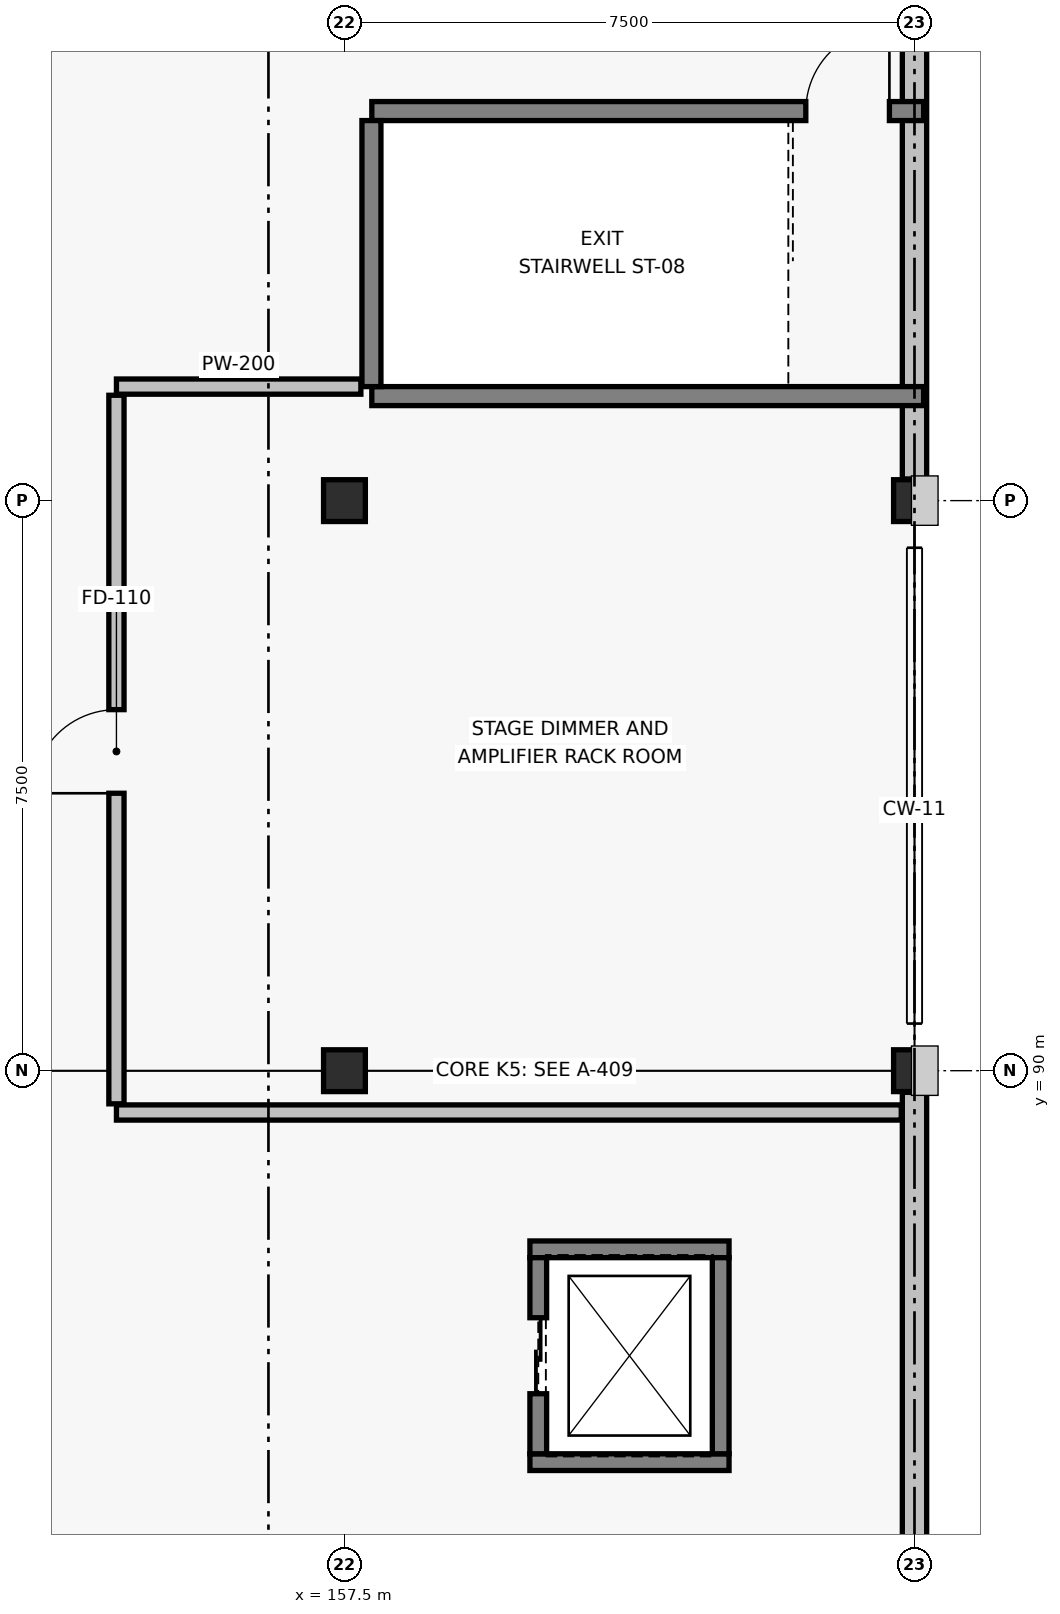
"""IFC4 building model, lengths in metres.
Left out: names, types, materials, properties, quantities, classifications, styles, units other than length and angle.
Written with IfcOpenShell. Run it as: python <this file> out.ifc"""

import sys

from ifc_helpers import new_model, si_unit, direction, frame, frame_2d, origin, origin_2d, place, context, subcontext, project, spatial, rectangle, extrude, element, fill, save


model = new_model("IFC4")
c1 = context("Model", 3, precision=1e-05, world=origin(), true_north=direction((0.0, 1.0)))
c2 = subcontext(c1, "Body", "Model", "MODEL_VIEW")
j1 = project(units=[si_unit("LENGTHUNIT", "METRE"), si_unit("PLANEANGLEUNIT", "RADIAN")], contexts=[c1])
p1 = place(None, origin())
s1 = spatial("IfcSite", under=j1, at=p1, CompositionType="ELEMENT")
p2 = place(p1, origin())
s2 = spatial("IfcBuilding", under=s1, at=p2, CompositionType="ELEMENT")
p3 = place(p2, frame((0.0, 0.0, 13.2)))
s3 = spatial("IfcBuildingStorey", under=s2, at=p3, CompositionType="ELEMENT", Elevation=13.2)
for number, where, z_axis, x_axis in (
    (1, (157.5, 90.0, 0.0), (0.0, 0.0, 1.0), (1.0, 0.0, 0.0)),
    (2, (157.5, 97.5, 0.0), (0.0, 0.0, 1.0), (1.0, 0.0, 0.0)),
    (3, (165.0, 90.0, 0.0), (0.0, 0.0, 1.0), (1.0, 0.0, 0.0)),
    (4, (165.0, 97.5, 0.0), (0.0, 0.0, 1.0), (1.0, 0.0, 0.0)),
):
    element("IfcColumn", number, at=place(p3, frame(where, z_axis=z_axis, x_axis=x_axis)), inside=s3, PredefinedType="COLUMN", context=c2, shape_type="SweptSolid", body=[
        extrude(rectangle(XDim=0.55, YDim=0.55, at=origin_2d()), origin(), (0.0, 0.0, 1.0), 3.9),
    ])
for number, where, z_axis, x_axis in (
    (5, (165.0, 82.785, 0.0), (0.0, 0.0, 1.0), (0.0, 1.0, 0.0)),
    (6, (165.0, 97.785, 0.0), (0.0, 0.0, 1.0), (0.0, 1.0, 0.0)),
):
    element("IfcWall", number, at=place(p3, frame(where, z_axis=z_axis, x_axis=x_axis)), inside=s3, PredefinedType="SOLIDWALL", context=c2, shape_type="SweptSolid", body=[
        extrude(rectangle(XDim=6.93, YDim=0.32, at=frame_2d((3.465, 0.0))), origin(), (0.0, 0.0, 1.0), 2.79),
    ])
p4 = place(p3, frame((157.86, 98.875, 0.0), z_axis=(0.0, 0.0, 1.0), x_axis=(1.0, 0.0, 0.0)))
e7 = element("IfcWall", 7, at=p4, inside=s3, PredefinedType="SOLIDWALL", context=c2, shape_type="SweptSolid", body=[
    extrude(rectangle(XDim=7.26, YDim=0.25, at=frame_2d((3.63, 0.0))), origin(), (0.0, 0.0, 1.0), 3.62),
])
p5 = place(p3, frame((157.86, 102.625, 0.0), z_axis=(0.0, 0.0, 1.0), x_axis=(1.0, 0.0, 0.0)))
e8 = element("IfcWall", 8, at=p5, inside=s3, PredefinedType="SOLIDWALL", context=c2, shape_type="SweptSolid", body=[
    extrude(rectangle(XDim=7.26, YDim=0.25, at=frame_2d((3.63, 0.0))), origin(), (0.0, 0.0, 1.0), 3.62),
])
p6 = place(p5, frame((5.71, 0.0, 0.0)))
e9 = element("IfcOpeningElement", 9, at=p6, cuts=e8, PredefinedType="OPENING", context=c2, shape_type="SweptSolid", body=[
    extrude(rectangle(XDim=1.1, YDim=2.15, at=frame_2d((0.55, 1.075))), frame((0.0, 0.135, 0.0), z_axis=(0.0, -1.0, 0.0), x_axis=(1.0, 0.0, 0.0)), (0.0, 0.0, 1.0), 0.27),
])
p7 = place(p3, frame((157.855, 99.0, 0.0), z_axis=(0.0, 0.0, 1.0), x_axis=(0.0, 1.0, 0.0)))
e10 = element("IfcWall", 10, at=p7, inside=s3, PredefinedType="SOLIDWALL", context=c2, shape_type="SweptSolid", body=[
    extrude(rectangle(XDim=3.5, YDim=0.25, at=frame_2d((1.75, 0.0))), origin(), (0.0, 0.0, 1.0), 3.62),
])
for number, where, z_axis, x_axis in (
    (11, (159.94, 84.85, 0.0), (0.0, 0.0, 1.0), (1.0, 0.0, 0.0)),
    (12, (159.94, 87.65, 0.0), (0.0, 0.0, 1.0), (1.0, 0.0, 0.0)),
):
    element("IfcWall", number, at=place(p3, frame(where, z_axis=z_axis, x_axis=x_axis)), inside=s3, PredefinedType="SOLIDWALL", context=c2, shape_type="SweptSolid", body=[
        extrude(rectangle(XDim=2.62, YDim=0.22, at=frame_2d((1.31, 0.0))), origin(), (0.0, 0.0, 1.0), 3.62),
    ])
p8 = place(p3, frame((160.05, 84.96, 0.0), z_axis=(0.0, 0.0, 1.0), x_axis=(0.0, 1.0, 0.0)))
e13 = element("IfcWall", 13, at=p8, inside=s3, PredefinedType="SOLIDWALL", context=c2, shape_type="SweptSolid", body=[
    extrude(rectangle(XDim=2.58, YDim=0.22, at=frame_2d((1.29, 0.0))), origin(), (0.0, 0.0, 1.0), 3.62),
])
p9 = place(p8, frame((0.79, 0.0, 0.0)))
e14 = element("IfcOpeningElement", 14, at=p9, cuts=e13, PredefinedType="OPENING", context=c2, shape_type="SweptSolid", body=[
    extrude(rectangle(XDim=1.0, YDim=2.15, at=frame_2d((0.5, 1.075))), frame((0.0, 0.12, 0.0), z_axis=(0.0, -1.0, 0.0), x_axis=(1.0, 0.0, 0.0)), (0.0, 0.0, 1.0), 0.24),
])
p10 = place(p3, frame((162.45, 84.96, 0.0), z_axis=(0.0, 0.0, 1.0), x_axis=(0.0, 1.0, 0.0)))
e15 = element("IfcWall", 15, at=p10, inside=s3, PredefinedType="SOLIDWALL", context=c2, shape_type="SweptSolid", body=[
    extrude(rectangle(XDim=2.58, YDim=0.22, at=frame_2d((1.29, 0.0))), origin(), (0.0, 0.0, 1.0), 3.62),
])
p11 = place(p3, frame((154.5, 89.45, 0.0), z_axis=(0.0, 0.0, 1.0), x_axis=(1.0, 0.0, 0.0)))
e16 = element("IfcWall", 16, at=p11, inside=s3, PredefinedType="PARTITIONING", context=c2, shape_type="SweptSolid", body=[
    extrude(rectangle(XDim=10.326, YDim=0.2, at=frame_2d((5.163, 0.0))), origin(), (0.0, 0.0, 1.0), 2.64),
])
p12 = place(p3, frame((154.5, 99.0, 0.0), z_axis=(0.0, 0.0, 1.0), x_axis=(1.0, 0.0, 0.0)))
e17 = element("IfcWall", 17, at=p12, inside=s3, PredefinedType="PARTITIONING", context=c2, shape_type="SweptSolid", body=[
    extrude(rectangle(XDim=3.216, YDim=0.2, at=frame_2d((1.608, 0.0))), origin(), (0.0, 0.0, 1.0), 2.97),
])
p13 = place(p3, frame((154.5, 89.564, 0.0), z_axis=(0.0, 0.0, 1.0), x_axis=(0.0, 1.0, 0.0)))
e18 = element("IfcWall", 18, at=p13, inside=s3, PredefinedType="PARTITIONING", context=c2, shape_type="SweptSolid", body=[
    extrude(rectangle(XDim=9.322, YDim=0.2, at=frame_2d((4.661, 0.0))), origin(), (0.0, 0.0, 1.0), 2.64),
])
p14 = place(p13, frame((4.086, 0.0, 0.0)))
e19 = element("IfcOpeningElement", 19, at=p14, cuts=e18, PredefinedType="OPENING", context=c2, shape_type="SweptSolid", body=[
    extrude(rectangle(XDim=1.1, YDim=2.15, at=frame_2d((0.55, 1.075))), frame((0.0, 0.11, 0.0), z_axis=(0.0, -1.0, 0.0), x_axis=(1.0, 0.0, 0.0)), (0.0, 0.0, 1.0), 0.22),
])
p15 = place(p6, origin())
e20 = element("IfcDoor", 20, at=p15, inside=s3, OperationType="SINGLE_SWING_RIGHT", PredefinedType="DOOR", context=c2, shape_type="SweptSolid", body=[
    extrude(rectangle(XDim=1.1, YDim=2.15, at=frame_2d((0.55, 1.075))), frame((0.0, 0.025, 0.0), z_axis=(0.0, -1.0, 0.0), x_axis=(1.0, 0.0, 0.0)), (0.0, 0.0, 1.0), 0.05),
])
fill(e9, e20)
p16 = place(p9, origin())
e21 = element("IfcDoor", 21, at=p16, inside=s3, OperationType="SLIDING_TO_LEFT", PredefinedType="DOOR", context=c2, shape_type="SweptSolid", body=[
    extrude(rectangle(XDim=1.0, YDim=2.15, at=frame_2d((0.5, 1.075))), frame((0.0, 0.025, 0.0), z_axis=(0.0, -1.0, 0.0), x_axis=(1.0, 0.0, 0.0)), (0.0, 0.0, 1.0), 0.05),
])
fill(e14, e21)
p17 = place(p14, origin())
e22 = element("IfcDoor", 22, at=p17, inside=s3, OperationType="SINGLE_SWING_LEFT", PredefinedType="DOOR", context=c2, shape_type="SweptSolid", body=[
    extrude(rectangle(XDim=1.1, YDim=2.15, at=frame_2d((0.55, 1.075))), frame((0.0, 0.025, 0.0), z_axis=(0.0, -1.0, 0.0), x_axis=(1.0, 0.0, 0.0)), (0.0, 0.0, 1.0), 0.05),
])
fill(e19, e22)
save(model, sys.argv[1])
